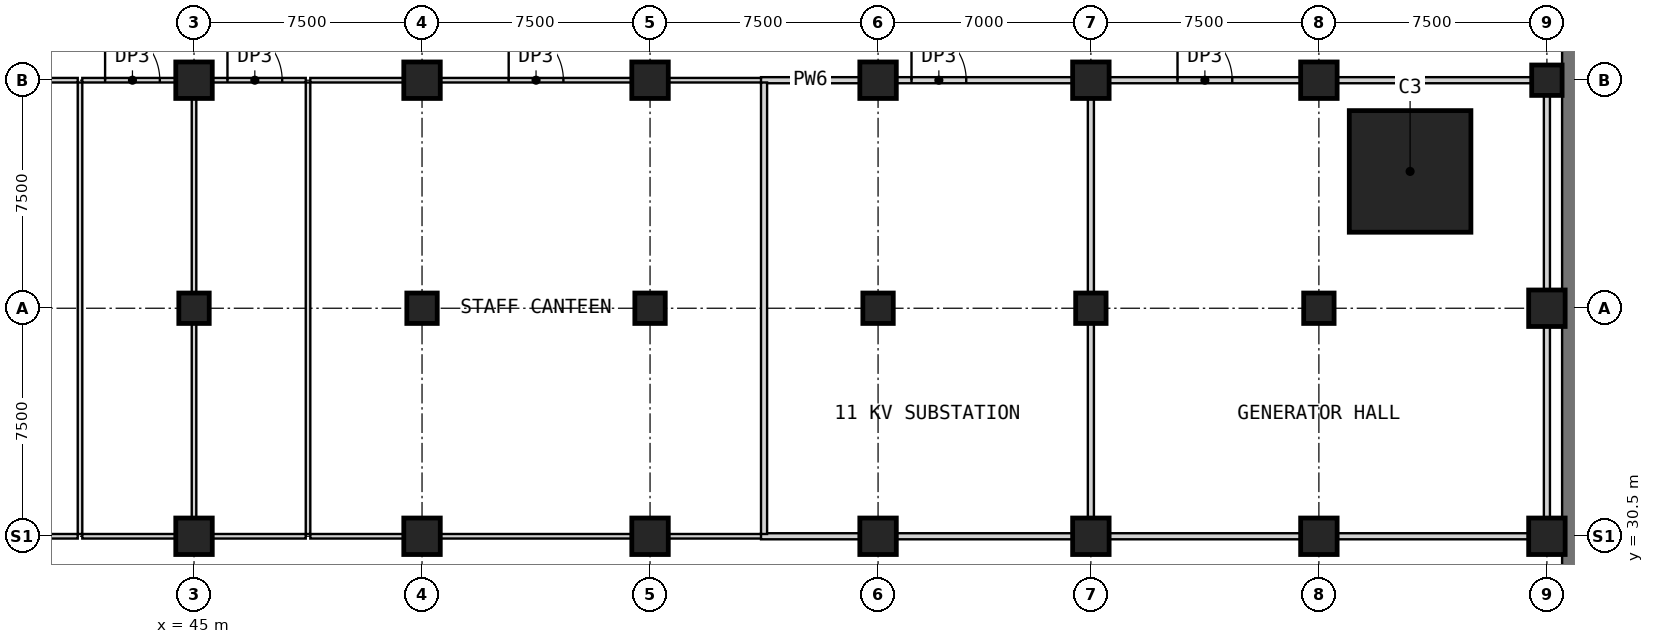
"""IFC4 building model, lengths in metres.
Left out: names, types, materials, properties, quantities, classifications, styles, units other than length and angle.
Written with IfcOpenShell. Run it as: python <this file> out.ifc"""

import sys

from ifc_helpers import new_model, si_unit, direction, frame, frame_2d, origin, origin_2d, place, context, subcontext, project, spatial, rectangle, extrude, element, fill, save


model = new_model("IFC4")
c1 = context("Model", 3, precision=1e-05, world=origin(), true_north=direction((0.0, 1.0)))
c2 = subcontext(c1, "Body", "Model", "MODEL_VIEW")
j1 = project(units=[si_unit("LENGTHUNIT", "METRE"), si_unit("PLANEANGLEUNIT", "RADIAN")], contexts=[c1])
p1 = place(None, origin())
s1 = spatial("IfcSite", under=j1, at=p1, CompositionType="ELEMENT")
p2 = place(p1, origin())
s2 = spatial("IfcBuilding", under=s1, at=p2, CompositionType="ELEMENT")
p3 = place(p2, frame((0.0, 0.0, -6.0)))
s3 = spatial("IfcBuildingStorey", under=s2, at=p3, CompositionType="ELEMENT", Elevation=-6.0)
p4 = place(p3, frame((90.5, 25.0, 0.0), z_axis=(0.0, 0.0, 1.0), x_axis=(0.0, 1.0, 0.0)))
e1 = element("IfcWall", 1, at=p4, inside=s3, PredefinedType="SHEAR", context=c2, shape_type="SweptSolid", body=[
    extrude(rectangle(XDim=92.5, YDim=1.0, at=frame_2d((46.25, 0.0))), origin(), (0.0, 0.0, 1.0), 4.8),
])
p5 = place(p4, frame((23.15, 0.0, 0.0)))
e2 = element("IfcOpeningElement", 2, at=p5, cuts=e1, PredefinedType="OPENING", context=c2, shape_type="SweptSolid", body=[
    extrude(rectangle(XDim=1.5, YDim=2.1, at=frame_2d((0.75, 1.05))), frame((0.0, 0.51, 0.0), z_axis=(0.0, -1.0, 0.0), x_axis=(1.0, 0.0, 0.0)), (0.0, 0.0, 1.0), 1.02),
])
p6 = place(p4, frame((67.75, 0.0, 0.0)))
e3 = element("IfcOpeningElement", 3, at=p6, cuts=e1, PredefinedType="OPENING", context=c2, shape_type="SweptSolid", body=[
    extrude(rectangle(XDim=1.5, YDim=2.1, at=frame_2d((0.75, 1.05))), frame((0.0, 0.51, 0.0), z_axis=(0.0, -1.0, 0.0), x_axis=(1.0, 0.0, 0.0)), (0.0, 0.0, 1.0), 1.02),
])
p7 = place(p3, frame((45.0, 38.0, 0.0), z_axis=(0.0, 0.0, 1.0), x_axis=(1.0, 0.0, 0.0)))
e4 = element("IfcColumn", 4, at=p7, inside=s3, PredefinedType="COLUMN", context=c2, shape_type="SweptSolid", body=[
    extrude(rectangle(XDim=1.0, YDim=1.0, at=origin_2d()), origin(), (0.0, 0.0, 1.0), 6.0),
])
p8 = place(p3, frame((45.0, 45.5, 0.0), z_axis=(0.0, 0.0, 1.0), x_axis=(1.0, 0.0, 0.0)))
e5 = element("IfcColumn", 5, at=p8, inside=s3, PredefinedType="COLUMN", context=c2, shape_type="SweptSolid", body=[
    extrude(rectangle(XDim=1.2, YDim=1.2, at=origin_2d()), origin(), (0.0, 0.0, 1.0), 6.0),
])
p9 = place(p3, frame((52.5, 38.0, 0.0), z_axis=(0.0, 0.0, 1.0), x_axis=(1.0, 0.0, 0.0)))
e6 = element("IfcColumn", 6, at=p9, inside=s3, PredefinedType="COLUMN", context=c2, shape_type="SweptSolid", body=[
    extrude(rectangle(XDim=1.0, YDim=1.0, at=origin_2d()), origin(), (0.0, 0.0, 1.0), 6.0),
])
p10 = place(p3, frame((52.5, 45.5, 0.0), z_axis=(0.0, 0.0, 1.0), x_axis=(1.0, 0.0, 0.0)))
e7 = element("IfcColumn", 7, at=p10, inside=s3, PredefinedType="COLUMN", context=c2, shape_type="SweptSolid", body=[
    extrude(rectangle(XDim=1.2, YDim=1.2, at=origin_2d()), origin(), (0.0, 0.0, 1.0), 6.0),
])
p11 = place(p3, frame((60.0, 38.0, 0.0), z_axis=(0.0, 0.0, 1.0), x_axis=(1.0, 0.0, 0.0)))
e8 = element("IfcColumn", 8, at=p11, inside=s3, PredefinedType="COLUMN", context=c2, shape_type="SweptSolid", body=[
    extrude(rectangle(XDim=1.0, YDim=1.0, at=origin_2d()), origin(), (0.0, 0.0, 1.0), 6.0),
])
p12 = place(p3, frame((60.0, 45.5, 0.0), z_axis=(0.0, 0.0, 1.0), x_axis=(1.0, 0.0, 0.0)))
e9 = element("IfcColumn", 9, at=p12, inside=s3, PredefinedType="COLUMN", context=c2, shape_type="SweptSolid", body=[
    extrude(rectangle(XDim=1.2, YDim=1.2, at=origin_2d()), origin(), (0.0, 0.0, 1.0), 6.0),
])
p13 = place(p3, frame((67.5, 38.0, 0.0), z_axis=(0.0, 0.0, 1.0), x_axis=(1.0, 0.0, 0.0)))
e10 = element("IfcColumn", 10, at=p13, inside=s3, PredefinedType="COLUMN", context=c2, shape_type="SweptSolid", body=[
    extrude(rectangle(XDim=1.0, YDim=1.0, at=origin_2d()), origin(), (0.0, 0.0, 1.0), 6.0),
])
p14 = place(p3, frame((67.5, 45.5, 0.0), z_axis=(0.0, 0.0, 1.0), x_axis=(1.0, 0.0, 0.0)))
e11 = element("IfcColumn", 11, at=p14, inside=s3, PredefinedType="COLUMN", context=c2, shape_type="SweptSolid", body=[
    extrude(rectangle(XDim=1.2, YDim=1.2, at=origin_2d()), origin(), (0.0, 0.0, 1.0), 6.0),
])
p15 = place(p3, frame((74.5, 38.0, 0.0), z_axis=(0.0, 0.0, 1.0), x_axis=(1.0, 0.0, 0.0)))
e12 = element("IfcColumn", 12, at=p15, inside=s3, PredefinedType="COLUMN", context=c2, shape_type="SweptSolid", body=[
    extrude(rectangle(XDim=1.0, YDim=1.0, at=origin_2d()), origin(), (0.0, 0.0, 1.0), 6.0),
])
p16 = place(p3, frame((74.5, 45.5, 0.0), z_axis=(0.0, 0.0, 1.0), x_axis=(1.0, 0.0, 0.0)))
e13 = element("IfcColumn", 13, at=p16, inside=s3, PredefinedType="COLUMN", context=c2, shape_type="SweptSolid", body=[
    extrude(rectangle(XDim=1.2, YDim=1.2, at=origin_2d()), origin(), (0.0, 0.0, 1.0), 6.0),
])
p17 = place(p3, frame((82.0, 38.0, 0.0), z_axis=(0.0, 0.0, 1.0), x_axis=(1.0, 0.0, 0.0)))
e14 = element("IfcColumn", 14, at=p17, inside=s3, PredefinedType="COLUMN", context=c2, shape_type="SweptSolid", body=[
    extrude(rectangle(XDim=1.0, YDim=1.0, at=origin_2d()), origin(), (0.0, 0.0, 1.0), 6.0),
])
p18 = place(p3, frame((82.0, 45.5, 0.0), z_axis=(0.0, 0.0, 1.0), x_axis=(1.0, 0.0, 0.0)))
e15 = element("IfcColumn", 15, at=p18, inside=s3, PredefinedType="COLUMN", context=c2, shape_type="SweptSolid", body=[
    extrude(rectangle(XDim=1.2, YDim=1.2, at=origin_2d()), origin(), (0.0, 0.0, 1.0), 6.0),
])
p19 = place(p3, frame((89.5, 45.5, 0.0), z_axis=(0.0, 0.0, 1.0), x_axis=(1.0, 0.0, 0.0)))
e16 = element("IfcColumn", 16, at=p19, inside=s3, PredefinedType="COLUMN", context=c2, shape_type="SweptSolid", body=[
    extrude(rectangle(XDim=1.0, YDim=1.0, at=origin_2d()), origin(), (0.0, 0.0, 1.0), 6.0),
])
p20 = place(p3, frame((85.0, 42.5, 0.0), z_axis=(0.0, 0.0, 1.0), x_axis=(1.0, 0.0, 0.0)))
e17 = element("IfcColumn", 17, at=p20, inside=s3, PredefinedType="COLUMN", context=c2, shape_type="SweptSolid", body=[
    extrude(rectangle(XDim=4.0, YDim=4.0, at=origin_2d()), origin(), (0.0, 0.0, 1.0), 6.0),
])
for number, where, z_axis, x_axis in (
    (18, (45.0, 30.5, 0.0), (0.0, 0.0, 1.0), (1.0, 0.0, 0.0)),
    (19, (52.5, 30.5, 0.0), (0.0, 0.0, 1.0), (1.0, 0.0, 0.0)),
    (20, (60.0, 30.5, 0.0), (0.0, 0.0, 1.0), (1.0, 0.0, 0.0)),
    (21, (67.5, 30.5, 0.0), (0.0, 0.0, 1.0), (1.0, 0.0, 0.0)),
    (22, (74.5, 30.5, 0.0), (0.0, 0.0, 1.0), (1.0, 0.0, 0.0)),
    (23, (82.0, 30.5, 0.0), (0.0, 0.0, 1.0), (1.0, 0.0, 0.0)),
    (24, (89.5, 30.5, 0.0), (0.0, 0.0, 1.0), (1.0, 0.0, 0.0)),
    (25, (89.5, 38.0, 0.0), (0.0, 0.0, 1.0), (1.0, 0.0, 0.0)),
):
    element("IfcColumn", number, at=place(p3, frame(where, z_axis=z_axis, x_axis=x_axis)), inside=s3, PredefinedType="COLUMN", context=c2, shape_type="SweptSolid", body=[
        extrude(rectangle(XDim=1.2, YDim=1.2, at=origin_2d()), origin(), (0.0, 0.0, 1.0), 6.0),
    ])
p21 = place(p3, frame((38.1, 45.5, 0.0), z_axis=(0.0, 0.0, 1.0), x_axis=(1.0, 0.0, 0.0)))
e26 = element("IfcWall", 26, at=p21, inside=s3, PredefinedType="PARTITIONING", context=c2, shape_type="SweptSolid", body=[
    extrude(rectangle(XDim=3.075, YDim=0.15, at=frame_2d((1.538, 0.0))), origin(), (0.0, 0.0, 1.0), 5.7),
])
p22 = place(p3, frame((41.325, 45.5, 0.0), z_axis=(0.0, 0.0, 1.0), x_axis=(1.0, 0.0, 0.0)))
e27 = element("IfcWall", 27, at=p22, inside=s3, PredefinedType="PARTITIONING", context=c2, shape_type="SweptSolid", body=[
    extrude(rectangle(XDim=3.075, YDim=0.15, at=frame_2d((1.538, 0.0))), origin(), (0.0, 0.0, 1.0), 5.7),
])
p23 = place(p22, frame((0.75, 0.0, 0.0)))
e28 = element("IfcOpeningElement", 28, at=p23, cuts=e27, PredefinedType="OPENING", context=c2, shape_type="SweptSolid", body=[
    extrude(rectangle(XDim=1.8, YDim=2.4, at=frame_2d((0.9, 1.2))), frame((0.0, 0.085, 0.0), z_axis=(0.0, -1.0, 0.0), x_axis=(1.0, 0.0, 0.0)), (0.0, 0.0, 1.0), 0.17),
])
p24 = place(p3, frame((45.6, 45.5, 0.0), z_axis=(0.0, 0.0, 1.0), x_axis=(1.0, 0.0, 0.0)))
e29 = element("IfcWall", 29, at=p24, inside=s3, PredefinedType="PARTITIONING", context=c2, shape_type="SweptSolid", body=[
    extrude(rectangle(XDim=3.075, YDim=0.15, at=frame_2d((1.538, 0.0))), origin(), (0.0, 0.0, 1.0), 5.7),
])
p25 = place(p24, frame((0.5, 0.0, 0.0)))
e30 = element("IfcOpeningElement", 30, at=p25, cuts=e29, PredefinedType="OPENING", context=c2, shape_type="SweptSolid", body=[
    extrude(rectangle(XDim=1.8, YDim=2.4, at=frame_2d((0.9, 1.2))), frame((0.0, 0.085, 0.0), z_axis=(0.0, -1.0, 0.0), x_axis=(1.0, 0.0, 0.0)), (0.0, 0.0, 1.0), 0.17),
])
p26 = place(p3, frame((48.825, 45.5, 0.0), z_axis=(0.0, 0.0, 1.0), x_axis=(1.0, 0.0, 0.0)))
e31 = element("IfcWall", 31, at=p26, inside=s3, PredefinedType="PARTITIONING", context=c2, shape_type="SweptSolid", body=[
    extrude(rectangle(XDim=3.075, YDim=0.15, at=frame_2d((1.538, 0.0))), origin(), (0.0, 0.0, 1.0), 5.7),
])
p27 = place(p3, frame((53.1, 45.5, 0.0), z_axis=(0.0, 0.0, 1.0), x_axis=(1.0, 0.0, 0.0)))
e32 = element("IfcWall", 32, at=p27, inside=s3, PredefinedType="PARTITIONING", context=c2, shape_type="SweptSolid", body=[
    extrude(rectangle(XDim=6.3, YDim=0.15, at=frame_2d((3.15, 0.0))), origin(), (0.0, 0.0, 1.0), 5.7),
])
p28 = place(p27, frame((2.25, 0.0, 0.0)))
e33 = element("IfcOpeningElement", 33, at=p28, cuts=e32, PredefinedType="OPENING", context=c2, shape_type="SweptSolid", body=[
    extrude(rectangle(XDim=1.8, YDim=2.4, at=frame_2d((0.9, 1.2))), frame((0.0, 0.085, 0.0), z_axis=(0.0, -1.0, 0.0), x_axis=(1.0, 0.0, 0.0)), (0.0, 0.0, 1.0), 0.17),
])
p29 = place(p3, frame((60.6, 45.5, 0.0), z_axis=(0.0, 0.0, 1.0), x_axis=(1.0, 0.0, 0.0)))
e34 = element("IfcWall", 34, at=p29, inside=s3, PredefinedType="PARTITIONING", context=c2, shape_type="SweptSolid", body=[
    extrude(rectangle(XDim=3.25, YDim=0.15, at=frame_2d((1.625, 0.0))), origin(), (0.0, 0.0, 1.0), 5.7),
])
p30 = place(p3, frame((63.65, 45.5, 0.0), z_axis=(0.0, 0.0, 1.0), x_axis=(1.0, 0.0, 0.0)))
e35 = element("IfcWall", 35, at=p30, inside=s3, PredefinedType="PARTITIONING", context=c2, shape_type="SweptSolid", body=[
    extrude(rectangle(XDim=3.25, YDim=0.2, at=frame_2d((1.625, 0.0))), origin(), (0.0, 0.0, 1.0), 5.7),
])
p31 = place(p3, frame((68.1, 45.5, 0.0), z_axis=(0.0, 0.0, 1.0), x_axis=(1.0, 0.0, 0.0)))
e36 = element("IfcWall", 36, at=p31, inside=s3, PredefinedType="PARTITIONING", context=c2, shape_type="SweptSolid", body=[
    extrude(rectangle(XDim=5.8, YDim=0.2, at=frame_2d((2.9, 0.0))), origin(), (0.0, 0.0, 1.0), 5.7),
])
p32 = place(p31, frame((0.5, 0.0, 0.0)))
e37 = element("IfcOpeningElement", 37, at=p32, cuts=e36, PredefinedType="OPENING", context=c2, shape_type="SweptSolid", body=[
    extrude(rectangle(XDim=1.8, YDim=2.4, at=frame_2d((0.9, 1.2))), frame((0.0, 0.11, 0.0), z_axis=(0.0, -1.0, 0.0), x_axis=(1.0, 0.0, 0.0)), (0.0, 0.0, 1.0), 0.22),
])
p33 = place(p3, frame((75.1, 45.5, 0.0), z_axis=(0.0, 0.0, 1.0), x_axis=(1.0, 0.0, 0.0)))
e38 = element("IfcWall", 38, at=p33, inside=s3, PredefinedType="PARTITIONING", context=c2, shape_type="SweptSolid", body=[
    extrude(rectangle(XDim=6.3, YDim=0.2, at=frame_2d((3.15, 0.0))), origin(), (0.0, 0.0, 1.0), 5.7),
])
p34 = place(p33, frame((2.25, 0.0, 0.0)))
e39 = element("IfcOpeningElement", 39, at=p34, cuts=e38, PredefinedType="OPENING", context=c2, shape_type="SweptSolid", body=[
    extrude(rectangle(XDim=1.8, YDim=2.4, at=frame_2d((0.9, 1.2))), frame((0.0, 0.11, 0.0), z_axis=(0.0, -1.0, 0.0), x_axis=(1.0, 0.0, 0.0)), (0.0, 0.0, 1.0), 0.22),
])
p35 = place(p3, frame((82.6, 45.5, 0.0), z_axis=(0.0, 0.0, 1.0), x_axis=(1.0, 0.0, 0.0)))
e40 = element("IfcWall", 40, at=p35, inside=s3, PredefinedType="PARTITIONING", context=c2, shape_type="SweptSolid", body=[
    extrude(rectangle(XDim=6.4, YDim=0.2, at=frame_2d((3.2, 0.0))), origin(), (0.0, 0.0, 1.0), 5.7),
])
for number, where, z_axis, x_axis in (
    (41, (38.1, 30.5, 0.0), (0.0, 0.0, 1.0), (1.0, 0.0, 0.0)),
    (42, (41.325, 30.5, 0.0), (0.0, 0.0, 1.0), (1.0, 0.0, 0.0)),
    (43, (45.6, 30.5, 0.0), (0.0, 0.0, 1.0), (1.0, 0.0, 0.0)),
    (44, (48.825, 30.5, 0.0), (0.0, 0.0, 1.0), (1.0, 0.0, 0.0)),
):
    element("IfcWall", number, at=place(p3, frame(where, z_axis=z_axis, x_axis=x_axis)), inside=s3, PredefinedType="PARTITIONING", context=c2, shape_type="SweptSolid", body=[
        extrude(rectangle(XDim=3.075, YDim=0.15, at=frame_2d((1.538, 0.0))), origin(), (0.0, 0.0, 1.0), 5.1),
    ])
p36 = place(p3, frame((53.1, 30.5, 0.0), z_axis=(0.0, 0.0, 1.0), x_axis=(1.0, 0.0, 0.0)))
e45 = element("IfcWall", 45, at=p36, inside=s3, PredefinedType="PARTITIONING", context=c2, shape_type="SweptSolid", body=[
    extrude(rectangle(XDim=6.3, YDim=0.15, at=frame_2d((3.15, 0.0))), origin(), (0.0, 0.0, 1.0), 5.1),
])
p37 = place(p3, frame((60.6, 30.5, 0.0), z_axis=(0.0, 0.0, 1.0), x_axis=(1.0, 0.0, 0.0)))
e46 = element("IfcWall", 46, at=p37, inside=s3, PredefinedType="PARTITIONING", context=c2, shape_type="SweptSolid", body=[
    extrude(rectangle(XDim=3.25, YDim=0.15, at=frame_2d((1.625, 0.0))), origin(), (0.0, 0.0, 1.0), 5.1),
])
p38 = place(p3, frame((63.65, 30.5, 0.0), z_axis=(0.0, 0.0, 1.0), x_axis=(1.0, 0.0, 0.0)))
e47 = element("IfcWall", 47, at=p38, inside=s3, PredefinedType="PARTITIONING", context=c2, shape_type="SweptSolid", body=[
    extrude(rectangle(XDim=3.25, YDim=0.2, at=frame_2d((1.625, 0.0))), origin(), (0.0, 0.0, 1.0), 5.1),
])
p39 = place(p3, frame((68.1, 30.5, 0.0), z_axis=(0.0, 0.0, 1.0), x_axis=(1.0, 0.0, 0.0)))
e48 = element("IfcWall", 48, at=p39, inside=s3, PredefinedType="PARTITIONING", context=c2, shape_type="SweptSolid", body=[
    extrude(rectangle(XDim=5.8, YDim=0.2, at=frame_2d((2.9, 0.0))), origin(), (0.0, 0.0, 1.0), 5.1),
])
for number, where, z_axis, x_axis in (
    (49, (75.1, 30.5, 0.0), (0.0, 0.0, 1.0), (1.0, 0.0, 0.0)),
    (50, (82.6, 30.5, 0.0), (0.0, 0.0, 1.0), (1.0, 0.0, 0.0)),
):
    element("IfcWall", number, at=place(p3, frame(where, z_axis=z_axis, x_axis=x_axis)), inside=s3, PredefinedType="PARTITIONING", context=c2, shape_type="SweptSolid", body=[
        extrude(rectangle(XDim=6.3, YDim=0.2, at=frame_2d((3.15, 0.0))), origin(), (0.0, 0.0, 1.0), 5.1),
    ])
for number, where, z_axis, x_axis in (
    (51, (45.0, 31.1, 0.0), (0.0, 0.0, 1.0), (0.0, 1.0, 0.0)),
    (52, (45.0, 38.5, 0.0), (0.0, 0.0, 1.0), (0.0, 1.0, 0.0)),
):
    element("IfcWall", number, at=place(p3, frame(where, z_axis=z_axis, x_axis=x_axis)), inside=s3, PredefinedType="PARTITIONING", context=c2, shape_type="SweptSolid", body=[
        extrude(rectangle(XDim=6.4, YDim=0.15, at=frame_2d((3.2, 0.0))), origin(), (0.0, 0.0, 1.0), 5.7),
    ])
for number, where, z_axis, x_axis in (
    (53, (74.5, 31.1, 0.0), (0.0, 0.0, 1.0), (0.0, 1.0, 0.0)),
    (54, (74.5, 38.5, 0.0), (0.0, 0.0, 1.0), (0.0, 1.0, 0.0)),
):
    element("IfcWall", number, at=place(p3, frame(where, z_axis=z_axis, x_axis=x_axis)), inside=s3, PredefinedType="PARTITIONING", context=c2, shape_type="SweptSolid", body=[
        extrude(rectangle(XDim=6.4, YDim=0.2, at=frame_2d((3.2, 0.0))), origin(), (0.0, 0.0, 1.0), 5.7),
    ])
p40 = place(p3, frame((89.5, 31.1, 0.0), z_axis=(0.0, 0.0, 1.0), x_axis=(0.0, 1.0, 0.0)))
e55 = element("IfcWall", 55, at=p40, inside=s3, PredefinedType="PARTITIONING", context=c2, shape_type="SweptSolid", body=[
    extrude(rectangle(XDim=6.3, YDim=0.2, at=frame_2d((3.15, 0.0))), origin(), (0.0, 0.0, 1.0), 5.7),
])
p41 = place(p3, frame((89.5, 38.6, 0.0), z_axis=(0.0, 0.0, 1.0), x_axis=(0.0, 1.0, 0.0)))
e56 = element("IfcWall", 56, at=p41, inside=s3, PredefinedType="PARTITIONING", context=c2, shape_type="SweptSolid", body=[
    extrude(rectangle(XDim=6.4, YDim=0.2, at=frame_2d((3.2, 0.0))), origin(), (0.0, 0.0, 1.0), 5.7),
])
for number, where, z_axis, x_axis in (
    (57, (41.25, 30.575, 0.0), (0.0, 0.0, 1.0), (0.0, 1.0, 0.0)),
    (58, (48.75, 30.575, 0.0), (0.0, 0.0, 1.0), (0.0, 1.0, 0.0)),
):
    element("IfcWall", number, at=place(p3, frame(where, z_axis=z_axis, x_axis=x_axis)), inside=s3, PredefinedType="PARTITIONING", context=c2, shape_type="SweptSolid", body=[
        extrude(rectangle(XDim=14.85, YDim=0.15, at=frame_2d((7.425, 0.0))), origin(), (0.0, 0.0, 1.0), 5.1),
    ])
p42 = place(p3, frame((63.75, 30.575, 0.0), z_axis=(0.0, 0.0, 1.0), x_axis=(0.0, 1.0, 0.0)))
e59 = element("IfcWall", 59, at=p42, inside=s3, PredefinedType="PARTITIONING", context=c2, shape_type="SweptSolid", body=[
    extrude(rectangle(XDim=14.85, YDim=0.2, at=frame_2d((7.425, 0.0))), origin(), (0.0, 0.0, 1.0), 5.1),
])
p43 = place(p23, origin())
e60 = element("IfcDoor", 60, at=p43, inside=s3, OperationType="SINGLE_SWING_LEFT", PredefinedType="DOOR", context=c2, shape_type="SweptSolid", body=[
    extrude(rectangle(XDim=1.8, YDim=2.4, at=frame_2d((0.9, 1.2))), frame((0.0, 0.025, 0.0), z_axis=(0.0, -1.0, 0.0), x_axis=(1.0, 0.0, 0.0)), (0.0, 0.0, 1.0), 0.05),
])
fill(e28, e60)
p44 = place(p25, origin())
e61 = element("IfcDoor", 61, at=p44, inside=s3, OperationType="SINGLE_SWING_LEFT", PredefinedType="DOOR", context=c2, shape_type="SweptSolid", body=[
    extrude(rectangle(XDim=1.8, YDim=2.4, at=frame_2d((0.9, 1.2))), frame((0.0, 0.025, 0.0), z_axis=(0.0, -1.0, 0.0), x_axis=(1.0, 0.0, 0.0)), (0.0, 0.0, 1.0), 0.05),
])
fill(e30, e61)
p45 = place(p28, origin())
e62 = element("IfcDoor", 62, at=p45, inside=s3, OperationType="SINGLE_SWING_LEFT", PredefinedType="DOOR", context=c2, shape_type="SweptSolid", body=[
    extrude(rectangle(XDim=1.8, YDim=2.4, at=frame_2d((0.9, 1.2))), frame((0.0, 0.025, 0.0), z_axis=(0.0, -1.0, 0.0), x_axis=(1.0, 0.0, 0.0)), (0.0, 0.0, 1.0), 0.05),
])
fill(e33, e62)
p46 = place(p32, origin())
e63 = element("IfcDoor", 63, at=p46, inside=s3, OperationType="SINGLE_SWING_LEFT", PredefinedType="DOOR", context=c2, shape_type="SweptSolid", body=[
    extrude(rectangle(XDim=1.8, YDim=2.4, at=frame_2d((0.9, 1.2))), frame((0.0, 0.025, 0.0), z_axis=(0.0, -1.0, 0.0), x_axis=(1.0, 0.0, 0.0)), (0.0, 0.0, 1.0), 0.05),
])
fill(e37, e63)
p47 = place(p34, origin())
e64 = element("IfcDoor", 64, at=p47, inside=s3, OperationType="SINGLE_SWING_LEFT", PredefinedType="DOOR", context=c2, shape_type="SweptSolid", body=[
    extrude(rectangle(XDim=1.8, YDim=2.4, at=frame_2d((0.9, 1.2))), frame((0.0, 0.025, 0.0), z_axis=(0.0, -1.0, 0.0), x_axis=(1.0, 0.0, 0.0)), (0.0, 0.0, 1.0), 0.05),
])
fill(e39, e64)
save(model, sys.argv[1])
